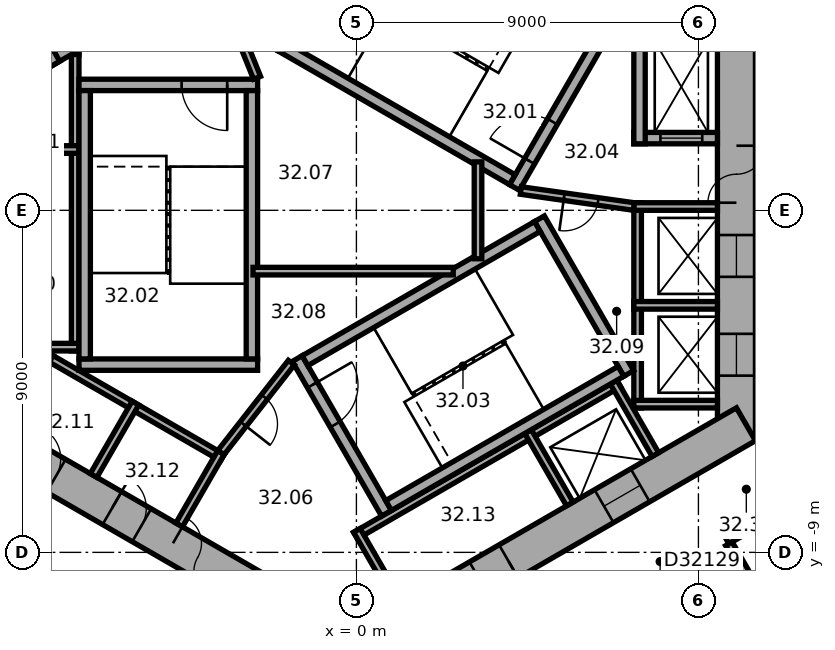
"""IFC4 building model, lengths in metres.
Left out: names, types, materials, properties, quantities, classifications, styles, units other than length and angle.
Written with IfcOpenShell. Run it as: python <this file> out.ifc"""

import sys

from ifc_helpers import new_model, si_unit, direction, frame, frame_2d, origin, place, context, subcontext, project, spatial, rectangle, extrude, element, fill, save


model = new_model("IFC4")
c1 = context("Model", 3, precision=1e-05, world=origin(), true_north=direction((0.0, 1.0)))
c2 = subcontext(c1, "Body", "Model", "MODEL_VIEW")
j1 = project(units=[si_unit("LENGTHUNIT", "METRE"), si_unit("PLANEANGLEUNIT", "RADIAN")], contexts=[c1])
p1 = place(None, origin())
s1 = spatial("IfcSite", under=j1, at=p1, CompositionType="ELEMENT")
p2 = place(p1, origin())
s2 = spatial("IfcBuilding", under=s1, at=p2, CompositionType="ELEMENT")
p3 = place(p2, frame((0.0, 0.0, 131.8)))
s3 = spatial("IfcBuildingStorey", under=s2, at=p3, CompositionType="ELEMENT", Elevation=131.8)
p4 = place(p3, frame((10.0, -6.062, 0.0), z_axis=(0.0, 0.0, 1.0), x_axis=(0.0, 1.0, 0.0)))
e1 = element("IfcWall", 1, at=p4, inside=s3, PredefinedType="SHEAR", context=c2, shape_type="SweptSolid", body=[
    extrude(rectangle(XDim=12.125, YDim=1.0, at=frame_2d((6.062, 0.0))), origin(), (0.0, 0.0, 1.0), 3.7),
])
p5 = place(p4, frame((6.262, 0.0, 0.0)))
e2 = element("IfcOpeningElement", 2, at=p5, cuts=e1, PredefinedType="OPENING", context=c2, shape_type="SweptSolid", body=[
    extrude(rectangle(XDim=1.5, YDim=2.1, at=frame_2d((0.75, 1.05))), frame((0.0, 0.51, 0.0), z_axis=(0.0, -1.0, 0.0), x_axis=(1.0, 0.0, 0.0)), (0.0, 0.0, 1.0), 1.02),
])
p6 = place(p4, frame((1.712, 0.0, 0.0)))
e3 = element("IfcOpeningElement", 3, at=p6, cuts=e1, PredefinedType="OPENING", context=c2, shape_type="SweptSolid", body=[
    extrude(rectangle(XDim=1.1, YDim=2.1, at=frame_2d((0.55, 1.05))), frame((0.0, 0.51, 0.0), z_axis=(0.0, -1.0, 0.0), x_axis=(1.0, 0.0, 0.0)), (0.0, 0.0, 1.0), 1.02),
])
p7 = place(p4, frame((4.312, 0.0, 0.0)))
e4 = element("IfcOpeningElement", 4, at=p7, cuts=e1, PredefinedType="OPENING", context=c2, shape_type="SweptSolid", body=[
    extrude(rectangle(XDim=1.1, YDim=2.1, at=frame_2d((0.55, 1.05))), frame((0.0, 0.51, 0.0), z_axis=(0.0, -1.0, 0.0), x_axis=(1.0, 0.0, 0.0)), (0.0, 0.0, 1.0), 1.02),
])
p8 = place(p3, frame((-10.25, -5.629, 0.0), z_axis=(0.0, 0.0, 1.0), x_axis=(0.866022616891, -0.50000482701, 0.0)))
e5 = element("IfcWall", 5, at=p8, inside=s3, PredefinedType="SHEAR", context=c2, shape_type="SweptSolid", body=[
    extrude(rectangle(XDim=12.125, YDim=1.0, at=frame_2d((6.062, 0.0))), origin(), (0.0, 0.0, 1.0), 3.7),
])
p9 = place(p8, frame((6.262, 0.0, 0.0)))
e6 = element("IfcOpeningElement", 6, at=p9, cuts=e5, PredefinedType="OPENING", context=c2, shape_type="SweptSolid", body=[
    extrude(rectangle(XDim=1.5, YDim=2.1, at=frame_2d((0.75, 1.05))), frame((0.0, 0.51, 0.0), z_axis=(0.0, -1.0, 0.0), x_axis=(1.0, 0.0, 0.0)), (0.0, 0.0, 1.0), 1.02),
])
p10 = place(p8, frame((1.812, 0.0, 0.0)))
e7 = element("IfcOpeningElement", 7, at=p10, cuts=e5, PredefinedType="OPENING", context=c2, shape_type="SweptSolid", body=[
    extrude(rectangle(XDim=0.9, YDim=2.1, at=frame_2d((0.45, 1.05))), frame((0.0, 0.51, 0.0), z_axis=(0.0, -1.0, 0.0), x_axis=(1.0, 0.0, 0.0)), (0.0, 0.0, 1.0), 1.02),
])
p11 = place(p8, frame((4.412, 0.0, 0.0)))
e8 = element("IfcOpeningElement", 8, at=p11, cuts=e5, PredefinedType="OPENING", context=c2, shape_type="SweptSolid", body=[
    extrude(rectangle(XDim=0.9, YDim=2.1, at=frame_2d((0.45, 1.05))), frame((0.0, 0.51, 0.0), z_axis=(0.0, -1.0, 0.0), x_axis=(1.0, 0.0, 0.0)), (0.0, 0.0, 1.0), 1.02),
])
p12 = place(p3, frame((-0.25, -11.691, 0.0), z_axis=(0.0, 0.0, 1.0), x_axis=(0.866022616891, 0.50000482701, 0.0)))
e9 = element("IfcWall", 9, at=p12, inside=s3, PredefinedType="SHEAR", context=c2, shape_type="SweptSolid", body=[
    extrude(rectangle(XDim=12.125, YDim=1.0, at=frame_2d((6.062, 0.0))), origin(), (0.0, 0.0, 1.0), 3.7),
])
p13 = place(p12, frame((4.012, 0.0, 0.0)))
e10 = element("IfcOpeningElement", 10, at=p13, cuts=e9, PredefinedType="OPENING", context=c2, shape_type="SweptSolid", body=[
    extrude(rectangle(XDim=0.9, YDim=2.1, at=frame_2d((0.45, 1.05))), frame((0.0, 0.51, 0.0), z_axis=(0.0, -1.0, 0.0), x_axis=(1.0, 0.0, 0.0)), (0.0, 0.0, 1.0), 1.02),
])
p14 = place(p12, frame((7.812, 0.0, 0.0)))
e11 = element("IfcOpeningElement", 11, at=p14, cuts=e9, PredefinedType="OPENING", context=c2, shape_type="SweptSolid", body=[
    extrude(rectangle(XDim=1.1, YDim=2.1, at=frame_2d((0.55, 1.05))), frame((0.0, 0.51, 0.0), z_axis=(0.0, -1.0, 0.0), x_axis=(1.0, 0.0, 0.0)), (0.0, 0.0, 1.0), 1.02),
])
p15 = place(p3, frame((7.4, -5.2, 0.0), z_axis=(0.0, 0.0, 1.0), x_axis=(0.0, 1.0, 0.0)))
e12 = element("IfcWall", 12, at=p15, inside=s3, PredefinedType="PARTITIONING", context=c2, shape_type="SweptSolid", body=[
    extrude(rectangle(XDim=5.4, YDim=0.2, at=frame_2d((2.7, 0.0))), origin(), (0.0, 0.0, 1.0), 3.42),
])
for number, where, z_axis, x_axis in (
    (13, (7.3, -5.1, 0.0), (0.0, 0.0, 1.0), (1.0, 0.0, 0.0)),
    (14, (7.3, -2.5, 0.0), (0.0, 0.0, 1.0), (1.0, 0.0, 0.0)),
    (15, (7.3, 0.1, 0.0), (0.0, 0.0, 1.0), (1.0, 0.0, 0.0)),
):
    element("IfcWall", number, at=place(p3, frame(where, z_axis=z_axis, x_axis=x_axis)), inside=s3, PredefinedType="PARTITIONING", context=c2, shape_type="SweptSolid", body=[
        extrude(rectangle(XDim=2.2, YDim=0.2, at=frame_2d((1.1, 0.0))), origin(), (0.0, 0.0, 1.0), 3.42),
    ])
p16 = place(p3, frame((-7.4, 4.3, 0.0), z_axis=(0.0, 0.0, 1.0), x_axis=(0.0, -1.0, 0.0)))
e16 = element("IfcWall", 16, at=p16, inside=s3, PredefinedType="PARTITIONING", context=c2, shape_type="SweptSolid", body=[
    extrude(rectangle(XDim=8.0, YDim=0.2, at=frame_2d((4.0, 0.0))), origin(), (0.0, 0.0, 1.0), 3.42),
])
for number, where, z_axis, x_axis in (
    (17, (-7.3, 4.2, 0.0), (0.0, 0.0, 1.0), (-1.0, 0.0, 0.0)),
    (18, (-7.3, 1.6, 0.0), (0.0, 0.0, 1.0), (-1.0, 0.0, 0.0)),
    (19, (-7.3, -3.6, 0.0), (0.0, 0.0, 1.0), (-1.0, 0.0, 0.0)),
):
    element("IfcWall", number, at=place(p3, frame(where, z_axis=z_axis, x_axis=x_axis)), inside=s3, PredefinedType="PARTITIONING", context=c2, shape_type="SweptSolid", body=[
        extrude(rectangle(XDim=2.2, YDim=0.2, at=frame_2d((1.1, 0.0))), origin(), (0.0, 0.0, 1.0), 3.42),
    ])
p17 = place(p3, frame((-8.203, -3.809, 0.0), z_axis=(0.0, 0.0, 1.0), x_axis=(0.866028230842, -0.499995103361, 0.0)))
e20 = element("IfcWall", 20, at=p17, inside=s3, PredefinedType="PARTITIONING", context=c2, shape_type="SweptSolid", body=[
    extrude(rectangle(XDim=5.4, YDim=0.2, at=frame_2d((2.7, 0.0))), origin(), (0.0, 0.0, 1.0), 3.42),
])
for number, where, z_axis, x_axis in (
    (21, (-8.067, -3.772, 0.0), (0.0, 0.0, 1.0), (-0.5, -0.866, 0.0)),
    (22, (-5.815, -5.072, 0.0), (0.0, 0.0, 1.0), (-0.5, -0.866, 0.0)),
):
    element("IfcWall", number, at=place(p3, frame(where, z_axis=z_axis, x_axis=x_axis)), inside=s3, PredefinedType="PARTITIONING", context=c2, shape_type="SweptSolid", body=[
        extrude(rectangle(XDim=2.2, YDim=0.2, at=frame_2d((1.1, 0.0))), origin(), (0.0, 0.0, 1.0), 3.42),
    ])
p18 = place(p3, frame((-3.563, -6.372, 0.0), z_axis=(0.0, 0.0, 1.0), x_axis=(-0.499994660107, -0.866028486751, 0.0)))
e23 = element("IfcWall", 23, at=p18, inside=s3, PredefinedType="PARTITIONING", context=c2, shape_type="SweptSolid", body=[
    extrude(rectangle(XDim=2.2, YDim=0.2, at=frame_2d((1.1, 0.0))), origin(), (0.0, 0.0, 1.0), 3.42),
])
p19 = place(p3, frame((-0.024, -8.559, 0.0), z_axis=(0.0, 0.0, 1.0), x_axis=(0.866026010844, 0.49999894854, 0.0)))
e24 = element("IfcWall", 24, at=p19, inside=s3, PredefinedType="PARTITIONING", context=c2, shape_type="SweptSolid", body=[
    extrude(rectangle(XDim=8.0, YDim=0.2, at=frame_2d((4.0, 0.0))), origin(), (0.0, 0.0, 1.0), 3.42),
])
for number, where, z_axis, x_axis in (
    (25, (0.013, -8.422, 0.0), (0.0, 0.0, 1.0), (0.5, -0.866, 0.0)),
    (26, (4.516, -5.822, 0.0), (0.0, 0.0, 1.0), (0.5, -0.866, 0.0)),
    (27, (6.768, -4.522, 0.0), (0.0, 0.0, 1.0), (0.5, -0.866, 0.0)),
):
    element("IfcWall", number, at=place(p3, frame(where, z_axis=z_axis, x_axis=x_axis)), inside=s3, PredefinedType="PARTITIONING", context=c2, shape_type="SweptSolid", body=[
        extrude(rectangle(XDim=2.2, YDim=0.2, at=frame_2d((1.1, 0.0))), origin(), (0.0, 0.0, 1.0), 3.42),
    ])
p20 = place(p3, frame((4.158, 0.602, 0.0), z_axis=(0.0, 0.0, 1.0), x_axis=(0.499977259774, 0.866038532462, 0.0)))
e28 = element("IfcWall", 28, at=p20, inside=s3, PredefinedType="SHEAR", context=c2, shape_type="SweptSolid", body=[
    extrude(rectangle(XDim=4.7, YDim=0.3, at=frame_2d((2.35, 0.0))), origin(), (0.0, 0.0, 1.0), 3.42),
])
p21 = place(p20, frame((0.8, 0.0, 0.0)))
e29 = element("IfcOpeningElement", 29, at=p21, cuts=e28, PredefinedType="OPENING", context=c2, shape_type="SweptSolid", body=[
    extrude(rectangle(XDim=1.2, YDim=2.1, at=frame_2d((0.6, 1.05))), frame((0.0, 0.16, 0.0), z_axis=(0.0, -1.0, 0.0), x_axis=(1.0, 0.0, 0.0)), (0.0, 0.0, 1.0), 0.32),
])
p22 = place(p3, frame((4.103, 0.807, 0.0), z_axis=(0.0, 0.0, 1.0), x_axis=(-0.866027801685, 0.499995846692, 0.0)))
e30 = element("IfcWall", 30, at=p22, inside=s3, PredefinedType="SHEAR", context=c2, shape_type="SweptSolid", body=[
    extrude(rectangle(XDim=7.06, YDim=0.3, at=frame_2d((3.53, 0.0))), origin(), (0.0, 0.0, 1.0), 3.42),
])
p23 = place(p3, frame((-2.6, 3.3, 0.0), z_axis=(0.0, 0.0, 1.0), x_axis=(-1.0, 0.0, 0.0)))
e31 = element("IfcWall", 31, at=p23, inside=s3, PredefinedType="SHEAR", context=c2, shape_type="SweptSolid", body=[
    extrude(rectangle(XDim=4.7, YDim=0.3, at=frame_2d((2.35, 0.0))), origin(), (0.0, 0.0, 1.0), 3.42),
])
p24 = place(p23, frame((0.8, 0.0, 0.0)))
e32 = element("IfcOpeningElement", 32, at=p24, cuts=e31, PredefinedType="OPENING", context=c2, shape_type="SweptSolid", body=[
    extrude(rectangle(XDim=1.2, YDim=2.1, at=frame_2d((0.6, 1.05))), frame((0.0, 0.16, 0.0), z_axis=(0.0, -1.0, 0.0), x_axis=(1.0, 0.0, 0.0)), (0.0, 0.0, 1.0), 0.32),
])
p25 = place(p3, frame((-2.6, -4.06, 0.0), z_axis=(0.0, 0.0, 1.0), x_axis=(-1.0, 0.0, 0.0)))
e33 = element("IfcWall", 33, at=p25, inside=s3, PredefinedType="SHEAR", context=c2, shape_type="SweptSolid", body=[
    extrude(rectangle(XDim=4.7, YDim=0.3, at=frame_2d((2.35, 0.0))), origin(), (0.0, 0.0, 1.0), 3.42),
])
for number, where, z_axis, x_axis in (
    (34, (-2.75, 3.15, 0.0), (0.0, 0.0, 1.0), (0.0, -1.0, 0.0)),
    (35, (-7.15, 3.15, 0.0), (0.0, 0.0, 1.0), (0.0, -1.0, 0.0)),
):
    element("IfcWall", number, at=place(p3, frame(where, z_axis=z_axis, x_axis=x_axis)), inside=s3, PredefinedType="SHEAR", context=c2, shape_type="SweptSolid", body=[
        extrude(rectangle(XDim=7.06, YDim=0.3, at=frame_2d((3.53, 0.0))), origin(), (0.0, 0.0, 1.0), 3.42),
    ])
p26 = place(p3, frame((-1.558, -3.902, 0.0), z_axis=(0.0, 0.0, 1.0), x_axis=(0.499977259774, -0.866038532462, 0.0)))
e36 = element("IfcWall", 36, at=p26, inside=s3, PredefinedType="SHEAR", context=c2, shape_type="SweptSolid", body=[
    extrude(rectangle(XDim=4.7, YDim=0.3, at=frame_2d((2.35, 0.0))), origin(), (0.0, 0.0, 1.0), 3.42),
])
p27 = place(p26, frame((0.8, 0.0, 0.0)))
e37 = element("IfcOpeningElement", 37, at=p27, cuts=e36, PredefinedType="OPENING", context=c2, shape_type="SweptSolid", body=[
    extrude(rectangle(XDim=1.2, YDim=2.1, at=frame_2d((0.6, 1.05))), frame((0.0, 0.16, 0.0), z_axis=(0.0, -1.0, 0.0), x_axis=(1.0, 0.0, 0.0)), (0.0, 0.0, 1.0), 0.32),
])
p28 = place(p3, frame((4.816, -0.222, 0.0), z_axis=(0.0, 0.0, 1.0), x_axis=(0.499977259774, -0.866038532462, 0.0)))
e38 = element("IfcWall", 38, at=p28, inside=s3, PredefinedType="SHEAR", context=c2, shape_type="SweptSolid", body=[
    extrude(rectangle(XDim=4.7, YDim=0.3, at=frame_2d((2.35, 0.0))), origin(), (0.0, 0.0, 1.0), 3.42),
])
for number, where, z_axis, x_axis in (
    (39, (-1.353, -3.957, 0.0), (0.0, 0.0, 1.0), (0.866, 0.5, 0.0)),
    (40, (0.847, -7.767, 0.0), (0.0, 0.0, 1.0), (0.866, 0.5, 0.0)),
):
    element("IfcWall", number, at=place(p3, frame(where, z_axis=z_axis, x_axis=x_axis)), inside=s3, PredefinedType="SHEAR", context=c2, shape_type="SweptSolid", body=[
        extrude(rectangle(XDim=7.06, YDim=0.3, at=frame_2d((3.53, 0.0))), origin(), (0.0, 0.0, 1.0), 3.42),
    ])
p29 = place(p3, frame((7.3, 1.9, 0.0), z_axis=(0.0, 0.0, 1.0), x_axis=(1.0, 0.0, 0.0)))
e41 = element("IfcWall", 41, at=p29, inside=s3, PredefinedType="SHEAR", context=c2, shape_type="SweptSolid", body=[
    extrude(rectangle(XDim=2.2, YDim=0.3, at=frame_2d((1.1, 0.0))), origin(), (0.0, 0.0, 1.0), 3.42),
])
p30 = place(p29, frame((0.7, 0.0, 0.0)))
e42 = element("IfcOpeningElement", 42, at=p30, cuts=e41, PredefinedType="OPENING", context=c2, shape_type="SweptSolid", body=[
    extrude(rectangle(XDim=1.1, YDim=2.1, at=frame_2d((0.55, 1.05))), frame((0.0, 0.16, 0.0), z_axis=(0.0, -1.0, 0.0), x_axis=(1.0, 0.0, 0.0)), (0.0, 0.0, 1.0), 0.32),
])
p31 = place(p3, frame((7.45, 1.75, 0.0), z_axis=(0.0, 0.0, 1.0), x_axis=(0.0, 1.0, 0.0)))
e43 = element("IfcWall", 43, at=p31, inside=s3, PredefinedType="SHEAR", context=c2, shape_type="SweptSolid", body=[
    extrude(rectangle(XDim=3.35, YDim=0.3, at=frame_2d((1.675, 0.0))), origin(), (0.0, 0.0, 1.0), 3.42),
])
p32 = place(p3, frame((4.327, 0.521, 0.0), z_axis=(0.0, 0.0, 1.0), x_axis=(0.990124376366, -0.14019172346, 0.0)))
e44 = element("IfcWall", 44, at=p32, inside=s3, PredefinedType="PARTITIONING", context=c2, shape_type="SweptSolid", body=[
    extrude(rectangle(XDim=3.002, YDim=0.2, at=frame_2d((1.501, 0.0))), origin(), (0.0, 0.0, 1.0), 3.42),
])
p33 = place(p32, frame((1.15, 0.0, 0.0)))
e45 = element("IfcOpeningElement", 45, at=p33, cuts=e44, PredefinedType="OPENING", context=c2, shape_type="SweptSolid", body=[
    extrude(rectangle(XDim=0.9, YDim=2.1, at=frame_2d((0.45, 1.05))), frame((0.0, 0.11, 0.0), z_axis=(0.0, -1.0, 0.0), x_axis=(1.0, 0.0, 0.0)), (0.0, 0.0, 1.0), 0.22),
])
p34 = place(p3, frame((-5.24, 5.577, 0.0), z_axis=(0.0, 0.0, 1.0), x_axis=(-0.866014461049, -0.500018952895, 0.0)))
e46 = element("IfcWall", 46, at=p34, inside=s3, PredefinedType="SHEAR", context=c2, shape_type="SweptSolid", body=[
    extrude(rectangle(XDim=3.35, YDim=0.3, at=frame_2d((1.675, 0.0))), origin(), (0.0, 0.0, 1.0), 3.42),
])
p35 = place(p3, frame((-7.937, 3.847, 0.0), z_axis=(0.0, 0.0, 1.0), x_axis=(-0.50002983664, 0.866008176907, 0.0)))
e47 = element("IfcWall", 47, at=p35, inside=s3, PredefinedType="SHEAR", context=c2, shape_type="SweptSolid", body=[
    extrude(rectangle(XDim=2.2, YDim=0.3, at=frame_2d((1.1, 0.0))), origin(), (0.0, 0.0, 1.0), 3.42),
])
p36 = place(p3, frame((-2.615, 3.487, 0.0), z_axis=(0.0, 0.0, 1.0), x_axis=(-0.373576831041, 0.92759924068, 0.0)))
e48 = element("IfcWall", 48, at=p36, inside=s3, PredefinedType="PARTITIONING", context=c2, shape_type="SweptSolid", body=[
    extrude(rectangle(XDim=3.002, YDim=0.2, at=frame_2d((1.501, 0.0))), origin(), (0.0, 0.0, 1.0), 3.42),
])
p37 = place(p36, frame((1.15, 0.0, 0.0)))
e49 = element("IfcOpeningElement", 49, at=p37, cuts=e48, PredefinedType="OPENING", context=c2, shape_type="SweptSolid", body=[
    extrude(rectangle(XDim=0.9, YDim=2.1, at=frame_2d((0.45, 1.05))), frame((0.0, 0.11, 0.0), z_axis=(0.0, -1.0, 0.0), x_axis=(1.0, 0.0, 0.0)), (0.0, 0.0, 1.0), 0.22),
])
p38 = place(p3, frame((-1.712, -4.008, 0.0), z_axis=(0.0, 0.0, 1.0), x_axis=(-0.616549420702, -0.787316208287, 0.0)))
e50 = element("IfcWall", 50, at=p38, inside=s3, PredefinedType="PARTITIONING", context=c2, shape_type="SweptSolid", body=[
    extrude(rectangle(XDim=3.002, YDim=0.2, at=frame_2d((1.501, 0.0))), origin(), (0.0, 0.0, 1.0), 3.42),
])
p39 = place(p38, frame((1.15, 0.0, 0.0)))
e51 = element("IfcOpeningElement", 51, at=p39, cuts=e50, PredefinedType="OPENING", context=c2, shape_type="SweptSolid", body=[
    extrude(rectangle(XDim=0.9, YDim=2.1, at=frame_2d((0.45, 1.05))), frame((0.0, 0.11, 0.0), z_axis=(0.0, -1.0, 0.0), x_axis=(1.0, 0.0, 0.0)), (0.0, 0.0, 1.0), 0.22),
])
p40 = place(p3, frame((-2.72, -1.6, 0.0), z_axis=(0.0, 0.0, 1.0), x_axis=(1.0, 0.0, 0.0)))
e52 = element("IfcWall", 52, at=p40, inside=s3, PredefinedType="PARTITIONING", context=c2, shape_type="SweptSolid", body=[
    extrude(rectangle(XDim=5.269, YDim=0.2, at=frame_2d((2.634, 0.0))), origin(), (0.0, 0.0, 1.0), 3.42),
])
p41 = place(p3, frame((3.2, -1.275, 0.0), z_axis=(0.0, 0.0, 1.0), x_axis=(0.0, 1.0, 0.0)))
e53 = element("IfcWall", 53, at=p41, inside=s3, PredefinedType="PARTITIONING", context=c2, shape_type="SweptSolid", body=[
    extrude(rectangle(XDim=2.549, YDim=0.2, at=frame_2d((1.275, 0.0))), origin(), (0.0, 0.0, 1.0), 3.42),
])
p42 = place(p3, frame((-11.415, -7.728, 0.0), z_axis=(0.0, 0.0, 1.0), x_axis=(0.866022749921, -0.500004596598, 0.0)))
e54 = element("IfcWall", 54, at=p42, inside=s3, PredefinedType="PARTITIONING", context=c2, shape_type="SweptSolid", body=[
    extrude(rectangle(XDim=12.084, YDim=0.2, at=frame_2d((6.042, 0.0))), origin(), (0.0, 0.0, 1.0), 3.42),
])
p43 = place(p42, frame((5.58, 0.0, 0.0)))
e55 = element("IfcOpeningElement", 55, at=p43, cuts=e54, PredefinedType="OPENING", context=c2, shape_type="SweptSolid", body=[
    extrude(rectangle(XDim=1.0, YDim=2.1, at=frame_2d((0.5, 1.05))), frame((0.0, 0.11, 0.0), z_axis=(0.0, -1.0, 0.0), x_axis=(1.0, 0.0, 0.0)), (0.0, 0.0, 1.0), 0.22),
])
p44 = place(p3, frame((9.752, -8.688, 0.0), z_axis=(0.0, 0.0, 1.0), x_axis=(0.865974105138, 0.500088841337, 0.0)))
e56 = element("IfcWall", 56, at=p44, inside=s3, PredefinedType="PARTITIONING", context=c2, shape_type="SweptSolid", body=[
    extrude(rectangle(XDim=1.961, YDim=0.2, at=frame_2d((0.98, 0.0))), origin(), (0.0, 0.0, 1.0), 3.42),
])
p45 = place(p3, frame((10.302, -9.642, 0.0), z_axis=(0.0, 0.0, 1.0), x_axis=(-0.500074377092, 0.865982457891, 0.0)))
e57 = element("IfcWall", 57, at=p45, inside=s3, PredefinedType="PARTITIONING", context=c2, shape_type="SweptSolid", body=[
    extrude(rectangle(XDim=1.001, YDim=0.2, at=frame_2d((0.5, 0.0))), origin(), (0.0, 0.0, 1.0), 3.42),
])
p46 = place(p5, origin())
e58 = element("IfcDoor", 58, at=p46, inside=s3, OperationType="DOUBLE_DOOR_SINGLE_SWING", PredefinedType="DOOR", context=c2, shape_type="SweptSolid", body=[
    extrude(rectangle(XDim=1.5, YDim=2.1, at=frame_2d((0.75, 1.05))), frame((0.0, 0.025, 0.0), z_axis=(0.0, -1.0, 0.0), x_axis=(1.0, 0.0, 0.0)), (0.0, 0.0, 1.0), 0.05),
])
fill(e2, e58)
p47 = place(p9, origin())
e59 = element("IfcDoor", 59, at=p47, inside=s3, OperationType="DOUBLE_DOOR_SINGLE_SWING", PredefinedType="DOOR", context=c2, shape_type="SweptSolid", body=[
    extrude(rectangle(XDim=1.5, YDim=2.1, at=frame_2d((0.75, 1.05))), frame((0.0, 0.025, 0.0), z_axis=(0.0, -1.0, 0.0), x_axis=(1.0, 0.0, 0.0)), (0.0, 0.0, 1.0), 0.05),
])
fill(e6, e59)
p48 = place(p21, origin())
e60 = element("IfcDoor", 60, at=p48, inside=s3, OperationType="SINGLE_SWING_RIGHT", PredefinedType="DOOR", context=c2, shape_type="SweptSolid", body=[
    extrude(rectangle(XDim=1.2, YDim=2.1, at=frame_2d((0.6, 1.05))), frame((0.0, 0.025, 0.0), z_axis=(0.0, -1.0, 0.0), x_axis=(1.0, 0.0, 0.0)), (0.0, 0.0, 1.0), 0.05),
])
fill(e29, e60)
p49 = place(p24, origin())
e61 = element("IfcDoor", 61, at=p49, inside=s3, OperationType="SINGLE_SWING_RIGHT", PredefinedType="DOOR", context=c2, shape_type="SweptSolid", body=[
    extrude(rectangle(XDim=1.2, YDim=2.1, at=frame_2d((0.6, 1.05))), frame((0.0, 0.025, 0.0), z_axis=(0.0, -1.0, 0.0), x_axis=(1.0, 0.0, 0.0)), (0.0, 0.0, 1.0), 0.05),
])
fill(e32, e61)
p50 = place(p27, origin())
e62 = element("IfcDoor", 62, at=p50, inside=s3, OperationType="SINGLE_SWING_RIGHT", PredefinedType="DOOR", context=c2, shape_type="SweptSolid", body=[
    extrude(rectangle(XDim=1.2, YDim=2.1, at=frame_2d((0.6, 1.05))), frame((0.0, 0.025, 0.0), z_axis=(0.0, -1.0, 0.0), x_axis=(1.0, 0.0, 0.0)), (0.0, 0.0, 1.0), 0.05),
])
fill(e37, e62)
p51 = place(p33, origin())
e63 = element("IfcDoor", 63, at=p51, inside=s3, OperationType="SINGLE_SWING_LEFT", PredefinedType="DOOR", context=c2, shape_type="SweptSolid", body=[
    extrude(rectangle(XDim=0.9, YDim=2.1, at=frame_2d((0.45, 1.05))), frame((0.0, 0.025, 0.0), z_axis=(0.0, -1.0, 0.0), x_axis=(1.0, 0.0, 0.0)), (0.0, 0.0, 1.0), 0.05),
])
fill(e45, e63)
p52 = place(p39, origin())
e64 = element("IfcDoor", 64, at=p52, inside=s3, OperationType="SINGLE_SWING_LEFT", PredefinedType="DOOR", context=c2, shape_type="SweptSolid", body=[
    extrude(rectangle(XDim=0.9, YDim=2.1, at=frame_2d((0.45, 1.05))), frame((0.0, 0.025, 0.0), z_axis=(0.0, -1.0, 0.0), x_axis=(1.0, 0.0, 0.0)), (0.0, 0.0, 1.0), 0.05),
])
fill(e51, e64)
p53 = place(p10, origin())
e65 = element("IfcDoor", 65, at=p53, inside=s3, OperationType="SINGLE_SWING_LEFT", PredefinedType="DOOR", context=c2, shape_type="SweptSolid", body=[
    extrude(rectangle(XDim=0.9, YDim=2.1, at=frame_2d((0.45, 1.05))), frame((0.0, 0.025, 0.0), z_axis=(0.0, -1.0, 0.0), x_axis=(1.0, 0.0, 0.0)), (0.0, 0.0, 1.0), 0.05),
])
fill(e7, e65)
p54 = place(p11, origin())
e66 = element("IfcDoor", 66, at=p54, inside=s3, OperationType="SINGLE_SWING_LEFT", PredefinedType="DOOR", context=c2, shape_type="SweptSolid", body=[
    extrude(rectangle(XDim=0.9, YDim=2.1, at=frame_2d((0.45, 1.05))), frame((0.0, 0.025, 0.0), z_axis=(0.0, -1.0, 0.0), x_axis=(1.0, 0.0, 0.0)), (0.0, 0.0, 1.0), 0.05),
])
fill(e8, e66)
p55 = place(p13, origin())
e67 = element("IfcDoor", 67, at=p55, inside=s3, OperationType="SINGLE_SWING_LEFT", PredefinedType="DOOR", context=c2, shape_type="SweptSolid", body=[
    extrude(rectangle(XDim=0.9, YDim=2.1, at=frame_2d((0.45, 1.05))), frame((0.0, 0.025, 0.0), z_axis=(0.0, -1.0, 0.0), x_axis=(1.0, 0.0, 0.0)), (0.0, 0.0, 1.0), 0.05),
])
fill(e10, e67)
p56 = place(p30, origin())
e68 = element("IfcDoor", 68, at=p56, inside=s3, OperationType="DOUBLE_DOOR_SLIDING", PredefinedType="DOOR", context=c2, shape_type="SweptSolid", body=[
    extrude(rectangle(XDim=1.1, YDim=2.1, at=frame_2d((0.55, 1.05))), frame((0.0, 0.025, 0.0), z_axis=(0.0, -1.0, 0.0), x_axis=(1.0, 0.0, 0.0)), (0.0, 0.0, 1.0), 0.05),
])
fill(e42, e68)
p57 = place(p6, origin())
e69 = element("IfcDoor", 69, at=p57, inside=s3, OperationType="DOUBLE_DOOR_SLIDING", PredefinedType="DOOR", context=c2, shape_type="SweptSolid", body=[
    extrude(rectangle(XDim=1.1, YDim=2.1, at=frame_2d((0.55, 1.05))), frame((0.0, 0.025, 0.0), z_axis=(0.0, -1.0, 0.0), x_axis=(1.0, 0.0, 0.0)), (0.0, 0.0, 1.0), 0.05),
])
fill(e3, e69)
p58 = place(p7, origin())
e70 = element("IfcDoor", 70, at=p58, inside=s3, OperationType="DOUBLE_DOOR_SLIDING", PredefinedType="DOOR", context=c2, shape_type="SweptSolid", body=[
    extrude(rectangle(XDim=1.1, YDim=2.1, at=frame_2d((0.55, 1.05))), frame((0.0, 0.025, 0.0), z_axis=(0.0, -1.0, 0.0), x_axis=(1.0, 0.0, 0.0)), (0.0, 0.0, 1.0), 0.05),
])
fill(e4, e70)
p59 = place(p14, origin())
e71 = element("IfcDoor", 71, at=p59, inside=s3, OperationType="DOUBLE_DOOR_SLIDING", PredefinedType="DOOR", context=c2, shape_type="SweptSolid", body=[
    extrude(rectangle(XDim=1.1, YDim=2.1, at=frame_2d((0.55, 1.05))), frame((0.0, 0.025, 0.0), z_axis=(0.0, -1.0, 0.0), x_axis=(1.0, 0.0, 0.0)), (0.0, 0.0, 1.0), 0.05),
])
fill(e11, e71)
save(model, sys.argv[1])
